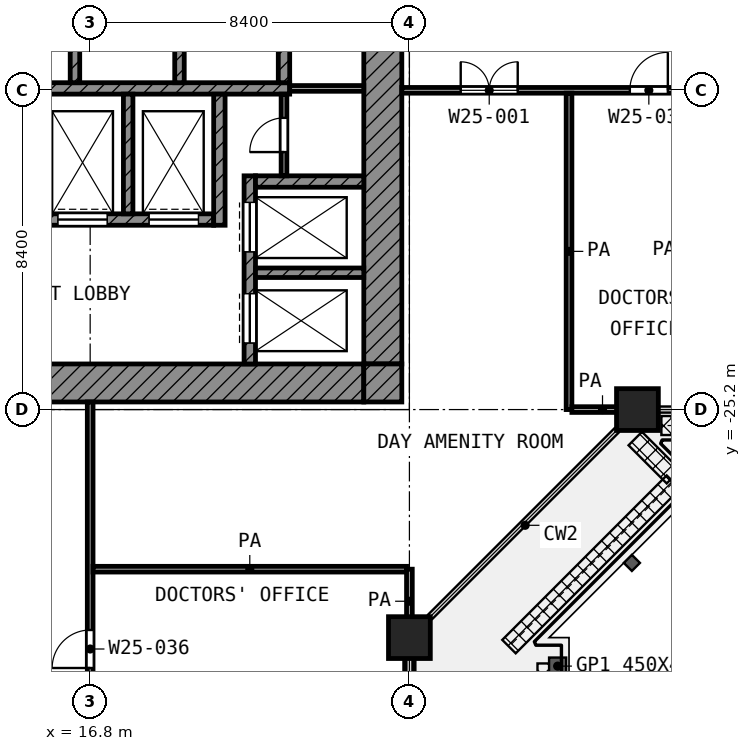
"""IFC4 building model, lengths in metres.
Left out: names, types, materials, properties, quantities, classifications, styles, units other than length and angle.
Written with IfcOpenShell. Run it as: python <this file> out.ifc"""

import sys

from ifc_helpers import new_model, si_unit, direction, frame, frame_2d, origin, origin_2d, place, context, subcontext, project, spatial, rectangle, extrude, element, fill, save


model = new_model("IFC4")
c1 = context("Model", 3, precision=1e-05, world=origin(), true_north=direction((0.0, 1.0)))
c2 = subcontext(c1, "Body", "Model", "MODEL_VIEW")
j1 = project(units=[si_unit("LENGTHUNIT", "METRE"), si_unit("PLANEANGLEUNIT", "RADIAN")], contexts=[c1])
p1 = place(None, origin())
s1 = spatial("IfcSite", under=j1, at=p1, CompositionType="ELEMENT")
p2 = place(p1, origin())
s2 = spatial("IfcBuilding", under=s1, at=p2, CompositionType="ELEMENT")
p3 = place(p2, frame((0.0, 0.0, 132.4)))
s3 = spatial("IfcBuildingStorey", under=s2, at=p3, CompositionType="ELEMENT", Elevation=132.4)
for number, where, z_axis, x_axis in (
    (1, (31.2, -25.2, 0.0), (0.0, 0.0, 1.0), (1.0, 0.0, 0.0)),
    (2, (25.2, -31.2, 0.0), (0.0, 0.0, 1.0), (1.0, 0.0, 0.0)),
):
    element("IfcColumn", number, at=place(p3, frame(where, z_axis=z_axis, x_axis=x_axis)), inside=s3, PredefinedType="COLUMN", context=c2, shape_type="SweptSolid", body=[
        extrude(rectangle(XDim=1.1, YDim=1.1, at=origin_2d()), origin(), (0.0, 0.0, 1.0), 4.2),
    ])
p4 = place(p3, frame((25.2, -34.992, 0.0), z_axis=(0.0, 0.0, 1.0), x_axis=(0.0, 1.0, 0.0)))
e3 = element("IfcWall", 3, at=p4, inside=s3, PredefinedType="SOLIDWALL", context=c2, shape_type="SweptSolid", body=[
    extrude(rectangle(XDim=3.242, YDim=0.25, at=frame_2d((1.621, 0.0))), origin(), (0.0, 0.0, 1.0), 3.48),
])
p5 = place(p4, frame((1.621, 0.0, 0.0)))
e4 = element("IfcOpeningElement", 4, at=p5, cuts=e3, PredefinedType="OPENING", context=c2, shape_type="SweptSolid", body=[
    extrude(rectangle(XDim=1.0, YDim=2.1, at=frame_2d((0.5, 1.05))), frame((0.0, 0.135, 0.0), z_axis=(0.0, -1.0, 0.0), x_axis=(1.0, 0.0, 0.0)), (0.0, 0.0, 1.0), 0.27),
])
p6 = place(p3, frame((24.5, -24.0, 0.0), z_axis=(0.0, 0.0, 1.0), x_axis=(0.0, 1.0, 0.0)))
e5 = element("IfcWall", 5, at=p6, inside=s3, PredefinedType="SHEAR", context=c2, shape_type="SweptSolid", body=[
    extrude(rectangle(XDim=18.6, YDim=1.0, at=frame_2d((9.3, 0.0))), origin(), (0.0, 0.0, 1.0), 3.6),
])
p7 = place(p6, frame((10.5, 0.0, 0.0)))
e6 = element("IfcOpeningElement", 6, at=p7, cuts=e5, PredefinedType="OPENING", context=c2, shape_type="SweptSolid", body=[
    extrude(rectangle(XDim=1.8, YDim=2.1, at=frame_2d((0.9, 1.05))), frame((0.0, 0.51, 0.0), z_axis=(0.0, -1.0, 0.0), x_axis=(1.0, 0.0, 0.0)), (0.0, 0.0, 1.0), 1.02),
])
p8 = place(p3, frame((5.4, -24.5, 0.0), z_axis=(0.0, 0.0, 1.0), x_axis=(1.0, 0.0, 0.0)))
e7 = element("IfcWall", 7, at=p8, inside=s3, PredefinedType="SHEAR", context=c2, shape_type="SweptSolid", body=[
    extrude(rectangle(XDim=18.6, YDim=1.0, at=frame_2d((9.3, 0.0))), origin(), (0.0, 0.0, 1.0), 3.6),
])
p9 = place(p8, frame((6.3, 0.0, 0.0)))
e8 = element("IfcOpeningElement", 8, at=p9, cuts=e7, PredefinedType="OPENING", context=c2, shape_type="SweptSolid", body=[
    extrude(rectangle(XDim=1.8, YDim=2.1, at=frame_2d((0.9, 1.05))), frame((0.0, 0.51, 0.0), z_axis=(0.0, -1.0, 0.0), x_axis=(1.0, 0.0, 0.0)), (0.0, 0.0, 1.0), 1.02),
])
p10 = place(p3, frame((24.5, -25.0, 0.0), z_axis=(0.0, 0.0, 1.0), x_axis=(0.0, 1.0, 0.0)))
e9 = element("IfcWall", 9, at=p10, inside=s3, PredefinedType="SHEAR", context=c2, shape_type="SweptSolid", body=[
    extrude(rectangle(XDim=1.0, YDim=1.0, at=frame_2d((0.5, 0.0))), origin(), (0.0, 0.0, 1.0), 3.6),
])
p11 = place(p3, frame((5.4, -16.75, 0.0), z_axis=(0.0, 0.0, 1.0), x_axis=(1.0, 0.0, 0.0)))
e10 = element("IfcWall", 10, at=p11, inside=s3, PredefinedType="SHEAR", context=c2, shape_type="SweptSolid", body=[
    extrude(rectangle(XDim=16.65, YDim=0.3, at=frame_2d((8.325, 0.0))), origin(), (0.0, 0.0, 1.0), 3.6),
])
p12 = place(p3, frame((5.4, -20.2, 0.0), z_axis=(0.0, 0.0, 1.0), x_axis=(1.0, 0.0, 0.0)))
e11 = element("IfcWall", 11, at=p12, inside=s3, PredefinedType="SHEAR", context=c2, shape_type="SweptSolid", body=[
    extrude(rectangle(XDim=14.65, YDim=0.3, at=frame_2d((7.325, 0.0))), origin(), (0.0, 0.0, 1.0), 3.6),
])
p13 = place(p12, frame((10.55, 0.0, 0.0)))
e12 = element("IfcOpeningElement", 12, at=p13, cuts=e11, PredefinedType="OPENING", context=c2, shape_type="SweptSolid", body=[
    extrude(rectangle(XDim=1.3, YDim=2.1, at=frame_2d((0.65, 1.05))), frame((0.0, 0.16, 0.0), z_axis=(0.0, -1.0, 0.0), x_axis=(1.0, 0.0, 0.0)), (0.0, 0.0, 1.0), 0.32),
])
p14 = place(p12, frame((12.95, 0.0, 0.0)))
e13 = element("IfcOpeningElement", 13, at=p14, cuts=e11, PredefinedType="OPENING", context=c2, shape_type="SweptSolid", body=[
    extrude(rectangle(XDim=1.3, YDim=2.1, at=frame_2d((0.65, 1.05))), frame((0.0, 0.16, 0.0), z_axis=(0.0, -1.0, 0.0), x_axis=(1.0, 0.0, 0.0)), (0.0, 0.0, 1.0), 0.32),
])
p15 = place(p12, frame((0.55, 0.0, 0.0)))
e14 = element("IfcOpeningElement", 14, at=p15, cuts=e11, PredefinedType="OPENING", context=c2, shape_type="SweptSolid", body=[
    extrude(rectangle(XDim=1.3, YDim=2.1, at=frame_2d((0.65, 1.05))), frame((0.0, 0.16, 0.0), z_axis=(0.0, -1.0, 0.0), x_axis=(1.0, 0.0, 0.0)), (0.0, 0.0, 1.0), 0.32),
])
p16 = place(p12, frame((2.95, 0.0, 0.0)))
e15 = element("IfcOpeningElement", 15, at=p16, cuts=e11, PredefinedType="OPENING", context=c2, shape_type="SweptSolid", body=[
    extrude(rectangle(XDim=1.3, YDim=2.1, at=frame_2d((0.65, 1.05))), frame((0.0, 0.16, 0.0), z_axis=(0.0, -1.0, 0.0), x_axis=(1.0, 0.0, 0.0)), (0.0, 0.0, 1.0), 0.32),
])
p17 = place(p12, frame((5.95, 0.0, 0.0)))
e16 = element("IfcOpeningElement", 16, at=p17, cuts=e11, PredefinedType="OPENING", context=c2, shape_type="SweptSolid", body=[
    extrude(rectangle(XDim=0.9, YDim=2.1, at=frame_2d((0.45, 1.05))), frame((0.0, 0.16, 0.0), z_axis=(0.0, -1.0, 0.0), x_axis=(1.0, 0.0, 0.0)), (0.0, 0.0, 1.0), 0.32),
])
p18 = place(p12, frame((8.35, 0.0, 0.0)))
e17 = element("IfcOpeningElement", 17, at=p18, cuts=e11, PredefinedType="OPENING", context=c2, shape_type="SweptSolid", body=[
    extrude(rectangle(XDim=0.9, YDim=2.1, at=frame_2d((0.45, 1.05))), frame((0.0, 0.16, 0.0), z_axis=(0.0, -1.0, 0.0), x_axis=(1.0, 0.0, 0.0)), (0.0, 0.0, 1.0), 0.32),
])
p19 = place(p3, frame((20.2, -20.35, 0.0), z_axis=(0.0, 0.0, 1.0), x_axis=(0.0, 1.0, 0.0)))
e18 = element("IfcWall", 18, at=p19, inside=s3, PredefinedType="SHEAR", context=c2, shape_type="SweptSolid", body=[
    extrude(rectangle(XDim=3.45, YDim=0.3, at=frame_2d((1.725, 0.0))), origin(), (0.0, 0.0, 1.0), 3.6),
])
p20 = place(p3, frame((21.9, -16.6, 0.0), z_axis=(0.0, 0.0, 1.0), x_axis=(0.0, 1.0, 0.0)))
e19 = element("IfcWall", 19, at=p20, inside=s3, PredefinedType="SHEAR", context=c2, shape_type="SweptSolid", body=[
    extrude(rectangle(XDim=2.35, YDim=0.3, at=frame_2d((1.175, 0.0))), origin(), (0.0, 0.0, 1.0), 3.6),
])
p21 = place(p3, frame((21.15, -19.2, 0.0), z_axis=(0.0, 0.0, 1.0), x_axis=(1.0, 0.0, 0.0)))
e20 = element("IfcWall", 20, at=p21, inside=s3, PredefinedType="SHEAR", context=c2, shape_type="SweptSolid", body=[
    extrude(rectangle(XDim=2.85, YDim=0.3, at=frame_2d((1.425, 0.0))), origin(), (0.0, 0.0, 1.0), 3.6),
])
p22 = place(p3, frame((21.0, -24.0, 0.0), z_axis=(0.0, 0.0, 1.0), x_axis=(0.0, 1.0, 0.0)))
e21 = element("IfcWall", 21, at=p22, inside=s3, PredefinedType="SHEAR", context=c2, shape_type="SweptSolid", body=[
    extrude(rectangle(XDim=4.95, YDim=0.3, at=frame_2d((2.475, 0.0))), origin(), (0.0, 0.0, 1.0), 3.6),
])
p23 = place(p22, frame((2.95, 0.0, 0.0)))
e22 = element("IfcOpeningElement", 22, at=p23, cuts=e21, PredefinedType="OPENING", context=c2, shape_type="SweptSolid", body=[
    extrude(rectangle(XDim=1.3, YDim=2.1, at=frame_2d((0.65, 1.05))), frame((0.0, 0.16, 0.0), z_axis=(0.0, -1.0, 0.0), x_axis=(1.0, 0.0, 0.0)), (0.0, 0.0, 1.0), 0.32),
])
p24 = place(p22, frame((0.55, 0.0, 0.0)))
e23 = element("IfcOpeningElement", 23, at=p24, cuts=e21, PredefinedType="OPENING", context=c2, shape_type="SweptSolid", body=[
    extrude(rectangle(XDim=1.3, YDim=2.1, at=frame_2d((0.65, 1.05))), frame((0.0, 0.16, 0.0), z_axis=(0.0, -1.0, 0.0), x_axis=(1.0, 0.0, 0.0)), (0.0, 0.0, 1.0), 0.32),
])
p25 = place(p3, frame((21.15, -21.6, 0.0), z_axis=(0.0, 0.0, 1.0), x_axis=(1.0, 0.0, 0.0)))
e24 = element("IfcWall", 24, at=p25, inside=s3, PredefinedType="SHEAR", context=c2, shape_type="SweptSolid", body=[
    extrude(rectangle(XDim=2.85, YDim=0.25, at=frame_2d((1.425, 0.0))), origin(), (0.0, 0.0, 1.0), 3.6),
])
p26 = place(p3, frame((17.8, -20.05, 0.0), z_axis=(0.0, 0.0, 1.0), x_axis=(0.0, 1.0, 0.0)))
e25 = element("IfcWall", 25, at=p26, inside=s3, PredefinedType="SHEAR", context=c2, shape_type="SweptSolid", body=[
    extrude(rectangle(XDim=3.15, YDim=0.25, at=frame_2d((1.575, 0.0))), origin(), (0.0, 0.0, 1.0), 3.6),
])
for number, where, z_axis, x_axis in (
    (26, (16.4, -16.6, 0.0), (0.0, 0.0, 1.0), (0.0, 1.0, 0.0)),
    (27, (19.15, -16.6, 0.0), (0.0, 0.0, 1.0), (0.0, 1.0, 0.0)),
):
    element("IfcWall", number, at=place(p3, frame(where, z_axis=z_axis, x_axis=x_axis)), inside=s3, PredefinedType="SHEAR", context=c2, shape_type="SweptSolid", body=[
        extrude(rectangle(XDim=2.35, YDim=0.25, at=frame_2d((1.175, 0.0))), origin(), (0.0, 0.0, 1.0), 3.6),
    ])
p27 = place(p3, frame((21.9, -19.05, 0.0), z_axis=(0.0, 0.0, 1.0), x_axis=(0.0, 1.0, 0.0)))
e28 = element("IfcWall", 28, at=p27, inside=s3, PredefinedType="PARTITIONING", context=c2, shape_type="SweptSolid", body=[
    extrude(rectangle(XDim=2.15, YDim=0.15, at=frame_2d((1.075, 0.0))), origin(), (0.0, 0.0, 1.0), 3.6),
])
p28 = place(p27, frame((0.625, 0.0, 0.0)))
e29 = element("IfcOpeningElement", 29, at=p28, cuts=e28, PredefinedType="OPENING", context=c2, shape_type="SweptSolid", body=[
    extrude(rectangle(XDim=0.9, YDim=2.1, at=frame_2d((0.45, 1.05))), frame((0.0, 0.085, 0.0), z_axis=(0.0, -1.0, 0.0), x_axis=(1.0, 0.0, 0.0)), (0.0, 0.0, 1.0), 0.17),
])
p29 = place(p3, frame((22.05, -16.75, 0.0), z_axis=(0.0, 0.0, 1.0), x_axis=(1.0, 0.0, 0.0)))
e30 = element("IfcWall", 30, at=p29, inside=s3, PredefinedType="PARTITIONING", context=c2, shape_type="SweptSolid", body=[
    extrude(rectangle(XDim=1.95, YDim=0.15, at=frame_2d((0.975, 0.0))), origin(), (0.0, 0.0, 1.0), 3.6),
])
p30 = place(p3, frame((16.875, -29.4, 0.0), z_axis=(0.0, 0.0, 1.0), x_axis=(1.0, 0.0, 0.0)))
e31 = element("IfcWall", 31, at=p30, inside=s3, PredefinedType="PARTITIONING", context=c2, shape_type="SweptSolid", body=[
    extrude(rectangle(XDim=8.25, YDim=0.15, at=frame_2d((4.125, 0.0))), origin(), (0.0, 0.0, 1.0), 3.6),
])
p31 = place(p3, frame((29.475, -25.2, 0.0), z_axis=(0.0, 0.0, 1.0), x_axis=(1.0, 0.0, 0.0)))
e32 = element("IfcWall", 32, at=p31, inside=s3, PredefinedType="PARTITIONING", context=c2, shape_type="SweptSolid", body=[
    extrude(rectangle(XDim=1.612, YDim=0.15, at=frame_2d((0.806, 0.0))), origin(), (0.0, 0.0, 1.0), 3.6),
])
p32 = place(p3, frame((25.0, -16.8, 0.0), z_axis=(0.0, 0.0, 1.0), x_axis=(1.0, 0.0, 0.0)))
e33 = element("IfcWall", 33, at=p32, inside=s3, PredefinedType="PARTITIONING", context=c2, shape_type="SweptSolid", body=[
    extrude(rectangle(XDim=50.52, YDim=0.15, at=frame_2d((25.26, 0.0))), origin(), (0.0, 0.0, 1.0), 3.6),
])
p33 = place(p32, frame((1.55, 0.0, 0.0)))
e34 = element("IfcOpeningElement", 34, at=p33, cuts=e33, PredefinedType="OPENING", context=c2, shape_type="SweptSolid", body=[
    extrude(rectangle(XDim=1.5, YDim=2.1, at=frame_2d((0.75, 1.05))), frame((0.0, 0.085, 0.0), z_axis=(0.0, -1.0, 0.0), x_axis=(1.0, 0.0, 0.0)), (0.0, 0.0, 1.0), 0.17),
])
p34 = place(p32, frame((6.0, 0.0, 0.0)))
e35 = element("IfcOpeningElement", 35, at=p34, cuts=e33, PredefinedType="OPENING", context=c2, shape_type="SweptSolid", body=[
    extrude(rectangle(XDim=1.0, YDim=2.1, at=frame_2d((0.5, 1.05))), frame((0.0, 0.085, 0.0), z_axis=(0.0, -1.0, 0.0), x_axis=(1.0, 0.0, 0.0)), (0.0, 0.0, 1.0), 0.17),
])
p35 = place(p32, frame((9.6, 0.0, 0.0)))
e36 = element("IfcOpeningElement", 36, at=p35, cuts=e33, PredefinedType="OPENING", context=c2, shape_type="SweptSolid", body=[
    extrude(rectangle(XDim=1.2, YDim=2.1, at=frame_2d((0.6, 1.05))), frame((0.0, 0.085, 0.0), z_axis=(0.0, -1.0, 0.0), x_axis=(1.0, 0.0, 0.0)), (0.0, 0.0, 1.0), 0.17),
])
p36 = place(p32, frame((18.2, 0.0, 0.0)))
e37 = element("IfcOpeningElement", 37, at=p36, cuts=e33, PredefinedType="OPENING", context=c2, shape_type="SweptSolid", body=[
    extrude(rectangle(XDim=1.2, YDim=2.1, at=frame_2d((0.6, 1.05))), frame((0.0, 0.085, 0.0), z_axis=(0.0, -1.0, 0.0), x_axis=(1.0, 0.0, 0.0)), (0.0, 0.0, 1.0), 0.17),
])
p37 = place(p32, frame((15.45, 0.0, 0.0)))
e38 = element("IfcOpeningElement", 38, at=p37, cuts=e33, PredefinedType="OPENING", context=c2, shape_type="SweptSolid", body=[
    extrude(rectangle(XDim=0.9, YDim=2.1, at=frame_2d((0.45, 1.05))), frame((0.0, 0.085, 0.0), z_axis=(0.0, -1.0, 0.0), x_axis=(1.0, 0.0, 0.0)), (0.0, 0.0, 1.0), 0.17),
])
p38 = place(p32, frame((23.6, 0.0, 0.0)))
e39 = element("IfcOpeningElement", 39, at=p38, cuts=e33, PredefinedType="OPENING", context=c2, shape_type="SweptSolid", body=[
    extrude(rectangle(XDim=1.2, YDim=2.1, at=frame_2d((0.6, 1.05))), frame((0.0, 0.085, 0.0), z_axis=(0.0, -1.0, 0.0), x_axis=(1.0, 0.0, 0.0)), (0.0, 0.0, 1.0), 0.17),
])
p39 = place(p32, frame((26.1, 0.0, 0.0)))
e40 = element("IfcOpeningElement", 40, at=p39, cuts=e33, PredefinedType="OPENING", context=c2, shape_type="SweptSolid", body=[
    extrude(rectangle(XDim=1.2, YDim=2.1, at=frame_2d((0.6, 1.05))), frame((0.0, 0.085, 0.0), z_axis=(0.0, -1.0, 0.0), x_axis=(1.0, 0.0, 0.0)), (0.0, 0.0, 1.0), 0.17),
])
p40 = place(p32, frame((32.0, 0.0, 0.0)))
e41 = element("IfcOpeningElement", 41, at=p40, cuts=e33, PredefinedType="OPENING", context=c2, shape_type="SweptSolid", body=[
    extrude(rectangle(XDim=1.2, YDim=2.1, at=frame_2d((0.6, 1.05))), frame((0.0, 0.085, 0.0), z_axis=(0.0, -1.0, 0.0), x_axis=(1.0, 0.0, 0.0)), (0.0, 0.0, 1.0), 0.17),
])
p41 = place(p32, frame((35.0, 0.0, 0.0)))
e42 = element("IfcOpeningElement", 42, at=p41, cuts=e33, PredefinedType="OPENING", context=c2, shape_type="SweptSolid", body=[
    extrude(rectangle(XDim=1.2, YDim=2.1, at=frame_2d((0.6, 1.05))), frame((0.0, 0.085, 0.0), z_axis=(0.0, -1.0, 0.0), x_axis=(1.0, 0.0, 0.0)), (0.0, 0.0, 1.0), 0.17),
])
p42 = place(p32, frame((40.4, 0.0, 0.0)))
e43 = element("IfcOpeningElement", 43, at=p42, cuts=e33, PredefinedType="OPENING", context=c2, shape_type="SweptSolid", body=[
    extrude(rectangle(XDim=1.2, YDim=2.1, at=frame_2d((0.6, 1.05))), frame((0.0, 0.085, 0.0), z_axis=(0.0, -1.0, 0.0), x_axis=(1.0, 0.0, 0.0)), (0.0, 0.0, 1.0), 0.17),
])
p43 = place(p32, frame((38.8, 0.0, 0.0)))
e44 = element("IfcOpeningElement", 44, at=p43, cuts=e33, PredefinedType="OPENING", context=c2, shape_type="SweptSolid", body=[
    extrude(rectangle(XDim=1.2, YDim=2.1, at=frame_2d((0.6, 1.05))), frame((0.0, 0.085, 0.0), z_axis=(0.0, -1.0, 0.0), x_axis=(1.0, 0.0, 0.0)), (0.0, 0.0, 1.0), 0.17),
])
p44 = place(p32, frame((47.85, 0.0, 0.0)))
e45 = element("IfcOpeningElement", 45, at=p44, cuts=e33, PredefinedType="OPENING", context=c2, shape_type="SweptSolid", body=[
    extrude(rectangle(XDim=1.0, YDim=2.1, at=frame_2d((0.5, 1.05))), frame((0.0, 0.085, 0.0), z_axis=(0.0, -1.0, 0.0), x_axis=(1.0, 0.0, 0.0)), (0.0, 0.0, 1.0), 0.17),
])
p45 = place(p3, frame((16.8, -58.72, 0.0), z_axis=(0.0, 0.0, 1.0), x_axis=(0.0, 1.0, 0.0)))
e46 = element("IfcWall", 46, at=p45, inside=s3, PredefinedType="PARTITIONING", context=c2, shape_type="SweptSolid", body=[
    extrude(rectangle(XDim=33.72, YDim=0.15, at=frame_2d((16.86, 0.0))), origin(), (0.0, 0.0, 1.0), 2.7),
])
p46 = place(p45, frame((26.72, 0.0, 0.0)))
e47 = element("IfcOpeningElement", 47, at=p46, cuts=e46, PredefinedType="OPENING", context=c2, shape_type="SweptSolid", body=[
    extrude(rectangle(XDim=1.0, YDim=2.1, at=frame_2d((0.5, 1.05))), frame((0.0, 0.085, 0.0), z_axis=(0.0, -1.0, 0.0), x_axis=(1.0, 0.0, 0.0)), (0.0, 0.0, 1.0), 0.17),
])
p47 = place(p45, frame((23.32, 0.0, 0.0)))
e48 = element("IfcOpeningElement", 48, at=p47, cuts=e46, PredefinedType="OPENING", context=c2, shape_type="SweptSolid", body=[
    extrude(rectangle(XDim=1.2, YDim=2.1, at=frame_2d((0.6, 1.05))), frame((0.0, 0.085, 0.0), z_axis=(0.0, -1.0, 0.0), x_axis=(1.0, 0.0, 0.0)), (0.0, 0.0, 1.0), 0.17),
])
p48 = place(p45, frame((14.92, 0.0, 0.0)))
e49 = element("IfcOpeningElement", 49, at=p48, cuts=e46, PredefinedType="OPENING", context=c2, shape_type="SweptSolid", body=[
    extrude(rectangle(XDim=1.2, YDim=2.1, at=frame_2d((0.6, 1.05))), frame((0.0, 0.085, 0.0), z_axis=(0.0, -1.0, 0.0), x_axis=(1.0, 0.0, 0.0)), (0.0, 0.0, 1.0), 0.17),
])
p49 = place(p45, frame((13.32, 0.0, 0.0)))
e50 = element("IfcOpeningElement", 50, at=p49, cuts=e46, PredefinedType="OPENING", context=c2, shape_type="SweptSolid", body=[
    extrude(rectangle(XDim=1.2, YDim=2.1, at=frame_2d((0.6, 1.05))), frame((0.0, 0.085, 0.0), z_axis=(0.0, -1.0, 0.0), x_axis=(1.0, 0.0, 0.0)), (0.0, 0.0, 1.0), 0.17),
])
p50 = place(p45, frame((9.52, 0.0, 0.0)))
e51 = element("IfcOpeningElement", 51, at=p50, cuts=e46, PredefinedType="OPENING", context=c2, shape_type="SweptSolid", body=[
    extrude(rectangle(XDim=1.2, YDim=2.1, at=frame_2d((0.6, 1.05))), frame((0.0, 0.085, 0.0), z_axis=(0.0, -1.0, 0.0), x_axis=(1.0, 0.0, 0.0)), (0.0, 0.0, 1.0), 0.17),
])
p51 = place(p45, frame((3.37, 0.0, 0.0)))
e52 = element("IfcOpeningElement", 52, at=p51, cuts=e46, PredefinedType="OPENING", context=c2, shape_type="SweptSolid", body=[
    extrude(rectangle(XDim=1.5, YDim=2.1, at=frame_2d((0.75, 1.05))), frame((0.0, 0.085, 0.0), z_axis=(0.0, -1.0, 0.0), x_axis=(1.0, 0.0, 0.0)), (0.0, 0.0, 1.0), 0.17),
])
p52 = place(p3, frame((25.2, -31.087, 0.0), z_axis=(0.0, 0.0, 1.0), x_axis=(0.0, 1.0, 0.0)))
e53 = element("IfcWall", 53, at=p52, inside=s3, PredefinedType="PARTITIONING", context=c2, shape_type="SweptSolid", body=[
    extrude(rectangle(XDim=1.687, YDim=0.15, at=frame_2d((0.844, 0.0))), origin(), (0.0, 0.0, 1.0), 3.6),
])
p53 = place(p3, frame((29.4, -25.2, 0.0), z_axis=(0.0, 0.0, 1.0), x_axis=(0.0, 1.0, 0.0)))
e54 = element("IfcWall", 54, at=p53, inside=s3, PredefinedType="PARTITIONING", context=c2, shape_type="SweptSolid", body=[
    extrude(rectangle(XDim=8.325, YDim=0.15, at=frame_2d((4.163, 0.0))), origin(), (0.0, 0.0, 1.0), 3.6),
])
p54 = place(p23, origin())
e55 = element("IfcDoor", 55, at=p54, inside=s3, OperationType="DOUBLE_DOOR_SLIDING", PredefinedType="DOOR", context=c2, shape_type="SweptSolid", body=[
    extrude(rectangle(XDim=1.3, YDim=2.1, at=frame_2d((0.65, 1.05))), frame((0.0, 0.025, 0.0), z_axis=(0.0, -1.0, 0.0), x_axis=(1.0, 0.0, 0.0)), (0.0, 0.0, 1.0), 0.05),
])
fill(e22, e55)
p55 = place(p24, origin())
e56 = element("IfcDoor", 56, at=p55, inside=s3, OperationType="DOUBLE_DOOR_SLIDING", PredefinedType="DOOR", context=c2, shape_type="SweptSolid", body=[
    extrude(rectangle(XDim=1.3, YDim=2.1, at=frame_2d((0.65, 1.05))), frame((0.0, 0.025, 0.0), z_axis=(0.0, -1.0, 0.0), x_axis=(1.0, 0.0, 0.0)), (0.0, 0.0, 1.0), 0.05),
])
fill(e23, e56)
p56 = place(p13, origin())
e57 = element("IfcDoor", 57, at=p56, inside=s3, OperationType="DOUBLE_DOOR_SLIDING", PredefinedType="DOOR", context=c2, shape_type="SweptSolid", body=[
    extrude(rectangle(XDim=1.3, YDim=2.1, at=frame_2d((0.65, 1.05))), frame((0.0, 0.025, 0.0), z_axis=(0.0, -1.0, 0.0), x_axis=(1.0, 0.0, 0.0)), (0.0, 0.0, 1.0), 0.05),
])
fill(e12, e57)
p57 = place(p14, origin())
e58 = element("IfcDoor", 58, at=p57, inside=s3, OperationType="DOUBLE_DOOR_SLIDING", PredefinedType="DOOR", context=c2, shape_type="SweptSolid", body=[
    extrude(rectangle(XDim=1.3, YDim=2.1, at=frame_2d((0.65, 1.05))), frame((0.0, 0.025, 0.0), z_axis=(0.0, -1.0, 0.0), x_axis=(1.0, 0.0, 0.0)), (0.0, 0.0, 1.0), 0.05),
])
fill(e13, e58)
p58 = place(p28, origin())
e59 = element("IfcDoor", 59, at=p58, inside=s3, OperationType="SINGLE_SWING_LEFT", PredefinedType="DOOR", context=c2, shape_type="SweptSolid", body=[
    extrude(rectangle(XDim=0.9, YDim=2.1, at=frame_2d((0.45, 1.05))), frame((0.0, 0.025, 0.0), z_axis=(0.0, -1.0, 0.0), x_axis=(1.0, 0.0, 0.0)), (0.0, 0.0, 1.0), 0.05),
])
fill(e29, e59)
p59 = place(p33, origin())
e60 = element("IfcDoor", 60, at=p59, inside=s3, OperationType="DOUBLE_DOOR_SINGLE_SWING", PredefinedType="DOOR", context=c2, shape_type="SweptSolid", body=[
    extrude(rectangle(XDim=1.5, YDim=2.1, at=frame_2d((0.75, 1.05))), frame((0.0, 0.025, 0.0), z_axis=(0.0, -1.0, 0.0), x_axis=(1.0, 0.0, 0.0)), (0.0, 0.0, 1.0), 0.05),
])
fill(e34, e60)
p60 = place(p34, origin())
e61 = element("IfcDoor", 61, at=p60, inside=s3, OperationType="SINGLE_SWING_RIGHT", PredefinedType="DOOR", context=c2, shape_type="SweptSolid", body=[
    extrude(rectangle(XDim=1.0, YDim=2.1, at=frame_2d((0.5, 1.05))), frame((0.0, 0.025, 0.0), z_axis=(0.0, -1.0, 0.0), x_axis=(1.0, 0.0, 0.0)), (0.0, 0.0, 1.0), 0.05),
])
fill(e35, e61)
p61 = place(p46, origin())
e62 = element("IfcDoor", 62, at=p61, inside=s3, OperationType="SINGLE_SWING_LEFT", PredefinedType="DOOR", context=c2, shape_type="SweptSolid", body=[
    extrude(rectangle(XDim=1.0, YDim=2.1, at=frame_2d((0.5, 1.05))), frame((0.0, 0.025, 0.0), z_axis=(0.0, -1.0, 0.0), x_axis=(1.0, 0.0, 0.0)), (0.0, 0.0, 1.0), 0.05),
])
fill(e47, e62)
save(model, sys.argv[1])
